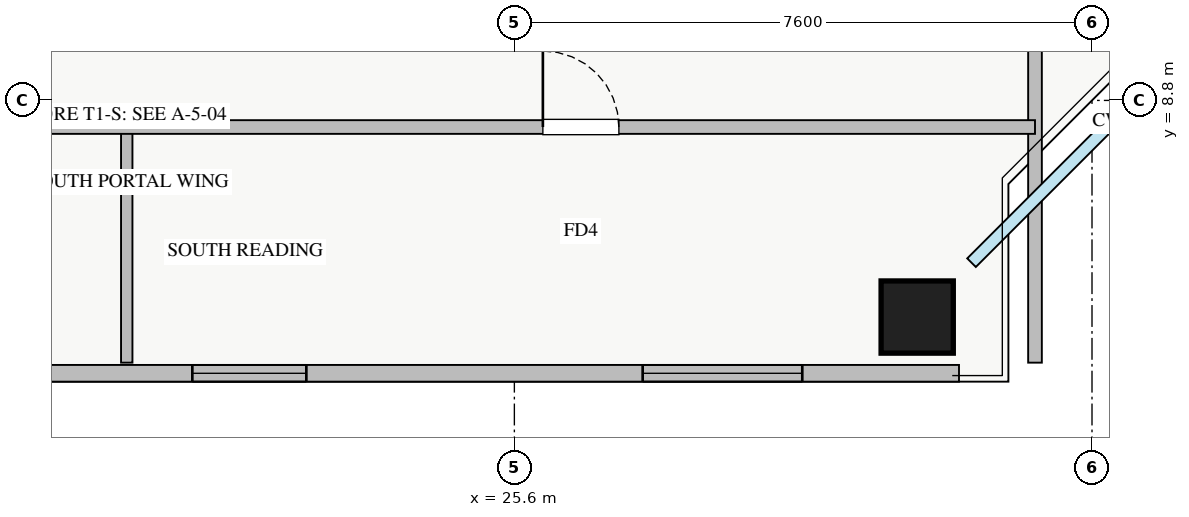
"""IFC4 building model, lengths in metres.
Left out: names, types, materials, properties, quantities, classifications, styles, units other than length and angle.
Written with IfcOpenShell. Run it as: python <this file> out.ifc"""

import sys

from ifc_helpers import new_model, si_unit, direction, frame, frame_2d, origin, origin_2d, place, context, subcontext, project, spatial, rectangle, extrude, source, transform, mapped, element, fill, save


model = new_model("IFC4")
c1 = context("Model", 3, precision=1e-05, world=origin(), true_north=direction((0.0, 1.0)))
c2 = subcontext(c1, "Body", "Model", "MODEL_VIEW")
j1 = project(units=[si_unit("LENGTHUNIT", "METRE"), si_unit("PLANEANGLEUNIT", "RADIAN")], contexts=[c1])
p1 = place(None, origin())
s1 = spatial("IfcSite", under=j1, at=p1, CompositionType="ELEMENT")
p2 = place(p1, origin())
s2 = spatial("IfcBuilding", under=s1, at=p2, CompositionType="ELEMENT")
p3 = place(p2, frame((0.0, 0.0, 166.5)))
s3 = spatial("IfcBuildingStorey", under=s2, at=p3, CompositionType="ELEMENT", Elevation=166.5)
m1 = source(origin(), c2, "Body", "SweptSolid", [
    extrude(rectangle(XDim=0.95, YDim=0.95, at=origin_2d()), origin(), (0.0, 0.0, 1.0), 3.25),
])
p4 = place(p3, frame((30.9, 5.95, 0.0), z_axis=(0.0, 0.0, 1.0), x_axis=(1.0, 0.0, 0.0)))
e1 = element("IfcColumn", 1, at=p4, inside=s3, PredefinedType="COLUMN", context=c2, shape_type="MappedRepresentation", body=[
    mapped(m1, transform((0.0, 0.0, 0.0), x_axis=(1.0, 0.0, 0.0), y_axis=(0.0, 1.0, 0.0), z_axis=(0.0, 0.0, 1.0), scale=1.0)),
])
p5 = place(p3, frame((6.55, 5.21, 0.0), z_axis=(0.0, 0.0, 1.0), x_axis=(1.0, 0.0, 0.0)))
e2 = element("IfcWall", 2, at=p5, inside=s3, PredefinedType="STANDARD", context=c2, shape_type="SweptSolid", body=[
    extrude(rectangle(XDim=24.9, YDim=0.22, at=frame_2d((12.45, 0.0))), origin(), (0.0, 0.0, 1.0), 2.61),
])
p6 = place(p5, frame((0.3, 0.0, 0.9)))
e3 = element("IfcOpeningElement", 3, at=p6, cuts=e2, PredefinedType="OPENING", context=c2, shape_type="SweptSolid", body=[
    extrude(rectangle(XDim=1.5, YDim=1.5, at=frame_2d((0.75, 0.75))), frame((0.0, 0.12, 0.0), z_axis=(0.0, -1.0, 0.0), x_axis=(1.0, 0.0, 0.0)), (0.0, 0.0, 1.0), 0.24),
])
p7 = place(p5, frame((8.438, 0.0, 0.9)))
e4 = element("IfcOpeningElement", 4, at=p7, cuts=e2, PredefinedType="OPENING", context=c2, shape_type="SweptSolid", body=[
    extrude(rectangle(XDim=1.8, YDim=1.45, at=frame_2d((0.9, 0.725))), frame((0.0, 0.12, 0.0), z_axis=(0.0, -1.0, 0.0), x_axis=(1.0, 0.0, 0.0)), (0.0, 0.0, 1.0), 0.24),
])
p8 = place(p5, frame((14.813, 0.0, 0.9)))
e5 = element("IfcOpeningElement", 5, at=p8, cuts=e2, PredefinedType="OPENING", context=c2, shape_type="SweptSolid", body=[
    extrude(rectangle(XDim=1.5, YDim=1.45, at=frame_2d((0.75, 0.725))), frame((0.0, 0.12, 0.0), z_axis=(0.0, -1.0, 0.0), x_axis=(1.0, 0.0, 0.0)), (0.0, 0.0, 1.0), 0.24),
])
p9 = place(p5, frame((20.738, 0.0, 0.9)))
e6 = element("IfcOpeningElement", 6, at=p9, cuts=e2, PredefinedType="OPENING", context=c2, shape_type="SweptSolid", body=[
    extrude(rectangle(XDim=2.1, YDim=1.48, at=frame_2d((1.05, 0.74))), frame((0.0, 0.12, 0.0), z_axis=(0.0, -1.0, 0.0), x_axis=(1.0, 0.0, 0.0)), (0.0, 0.0, 1.0), 0.24),
])
p10 = place(p5, frame((4.094, 0.0, 0.9)))
e7 = element("IfcOpeningElement", 7, at=p10, cuts=e2, PredefinedType="OPENING", context=c2, shape_type="SweptSolid", body=[
    extrude(rectangle(XDim=2.4, YDim=1.5, at=frame_2d((1.2, 0.75))), frame((0.0, 0.12, 0.0), z_axis=(0.0, -1.0, 0.0), x_axis=(1.0, 0.0, 0.0)), (0.0, 0.0, 1.0), 0.24),
])
p11 = place(p3, frame((32.45, 5.35, 0.0), z_axis=(0.0, 0.0, 1.0), x_axis=(0.0, 1.0, 0.0)))
e8 = element("IfcWall", 8, at=p11, inside=s3, PredefinedType="PARTITIONING", context=c2, shape_type="SweptSolid", body=[
    extrude(rectangle(XDim=11.35, YDim=0.18, at=frame_2d((5.675, 0.0))), origin(), (0.0, 0.0, 1.0), 3.07),
])
p12 = place(p11, frame((4.6, 0.0, 0.0)))
e9 = element("IfcOpeningElement", 9, at=p12, cuts=e8, PredefinedType="OPENING", context=c2, shape_type="SweptSolid", body=[
    extrude(rectangle(XDim=1.0, YDim=2.05, at=frame_2d((0.5, 1.025))), frame((0.0, 0.1, 0.0), z_axis=(0.0, -1.0, 0.0), x_axis=(1.0, 0.0, 0.0)), (0.0, 0.0, 1.0), 0.2),
])
p13 = place(p11, frame((8.8, 0.0, 0.0)))
e10 = element("IfcOpeningElement", 10, at=p13, cuts=e8, PredefinedType="OPENING", context=c2, shape_type="SweptSolid", body=[
    extrude(rectangle(XDim=1.0, YDim=2.05, at=frame_2d((0.5, 1.025))), frame((0.0, 0.1, 0.0), z_axis=(0.0, -1.0, 0.0), x_axis=(1.0, 0.0, 0.0)), (0.0, 0.0, 1.0), 0.2),
])
p14 = place(p3, frame((20.5, 5.35, 0.0), z_axis=(0.0, 0.0, 1.0), x_axis=(0.0, 1.0, 0.0)))
e11 = element("IfcWall", 11, at=p14, inside=s3, PredefinedType="PARTITIONING", context=c2, shape_type="SweptSolid", body=[
    extrude(rectangle(XDim=3.1, YDim=0.15, at=frame_2d((1.55, 0.0))), origin(), (0.0, 0.0, 1.0), 3.07),
])
p15 = place(p3, frame((8.65, 8.45, 0.0), z_axis=(0.0, 0.0, 1.0), x_axis=(1.0, 0.0, 0.0)))
e12 = element("IfcWall", 12, at=p15, inside=s3, PredefinedType="PARTITIONING", context=c2, shape_type="SweptSolid", body=[
    extrude(rectangle(XDim=23.8, YDim=0.18, at=frame_2d((11.9, 0.0))), origin(), (0.0, 0.0, 1.0), 3.07),
])
p16 = place(p15, frame((5.425, 0.0, 0.0)))
e13 = element("IfcOpeningElement", 13, at=p16, cuts=e12, PredefinedType="OPENING", context=c2, shape_type="SweptSolid", body=[
    extrude(rectangle(XDim=1.0, YDim=2.05, at=frame_2d((0.5, 1.025))), frame((0.0, 0.1, 0.0), z_axis=(0.0, -1.0, 0.0), x_axis=(1.0, 0.0, 0.0)), (0.0, 0.0, 1.0), 0.2),
])
p17 = place(p15, frame((17.325, 0.0, 0.0)))
e14 = element("IfcOpeningElement", 14, at=p17, cuts=e12, PredefinedType="OPENING", context=c2, shape_type="SweptSolid", body=[
    extrude(rectangle(XDim=1.0, YDim=2.05, at=frame_2d((0.5, 1.025))), frame((0.0, 0.1, 0.0), z_axis=(0.0, -1.0, 0.0), x_axis=(1.0, 0.0, 0.0)), (0.0, 0.0, 1.0), 0.2),
])
m2 = source(origin(), c2, "Body", "SweptSolid", [
    extrude(rectangle(XDim=1.5, YDim=1.45, at=frame_2d((0.75, 0.725))), frame((0.0, 0.03, 0.0), z_axis=(0.0, -1.0, 0.0), x_axis=(1.0, 0.0, 0.0)), (0.0, 0.0, 1.0), 0.06),
])
p18 = place(p8, origin())
e15 = element("IfcWindow", 15, at=p18, inside=s3, PartitioningType="DOUBLE_PANEL_VERTICAL", PredefinedType="WINDOW", context=c2, shape_type="MappedRepresentation", body=[
    mapped(m2, transform((0.0, 0.0, 0.0), x_axis=(1.0, 0.0, 0.0), y_axis=(0.0, 1.0, 0.0), z_axis=(0.0, 0.0, 1.0), scale=1.0)),
])
fill(e5, e15)
m3 = source(origin(), c2, "Body", "SweptSolid", [
    extrude(rectangle(XDim=2.1, YDim=1.48, at=frame_2d((1.05, 0.74))), frame((0.0, 0.03, 0.0), z_axis=(0.0, -1.0, 0.0), x_axis=(1.0, 0.0, 0.0)), (0.0, 0.0, 1.0), 0.06),
])
p19 = place(p9, origin())
e16 = element("IfcWindow", 16, at=p19, inside=s3, PartitioningType="TRIPLE_PANEL_VERTICAL", PredefinedType="WINDOW", context=c2, shape_type="MappedRepresentation", body=[
    mapped(m3, transform((0.0, 0.0, 0.0), x_axis=(1.0, 0.0, 0.0), y_axis=(0.0, 1.0, 0.0), z_axis=(0.0, 0.0, 1.0), scale=1.0)),
])
fill(e6, e16)
m4 = source(origin(), c2, "Body", "SweptSolid", [
    extrude(rectangle(XDim=1.0, YDim=2.05, at=frame_2d((0.5, 1.025))), frame((0.0, 0.025, 0.0), z_axis=(0.0, -1.0, 0.0), x_axis=(1.0, 0.0, 0.0)), (0.0, 0.0, 1.0), 0.05),
])
p20 = place(p17, origin())
e17 = element("IfcDoor", 17, at=p20, inside=s3, OperationType="SINGLE_SWING_LEFT", PredefinedType="DOOR", context=c2, shape_type="MappedRepresentation", body=[
    mapped(m4, transform((0.0, 0.0, 0.0), x_axis=(1.0, 0.0, 0.0), y_axis=(0.0, 1.0, 0.0), z_axis=(0.0, 0.0, 1.0), scale=1.0)),
])
fill(e14, e17)
save(model, sys.argv[1])
